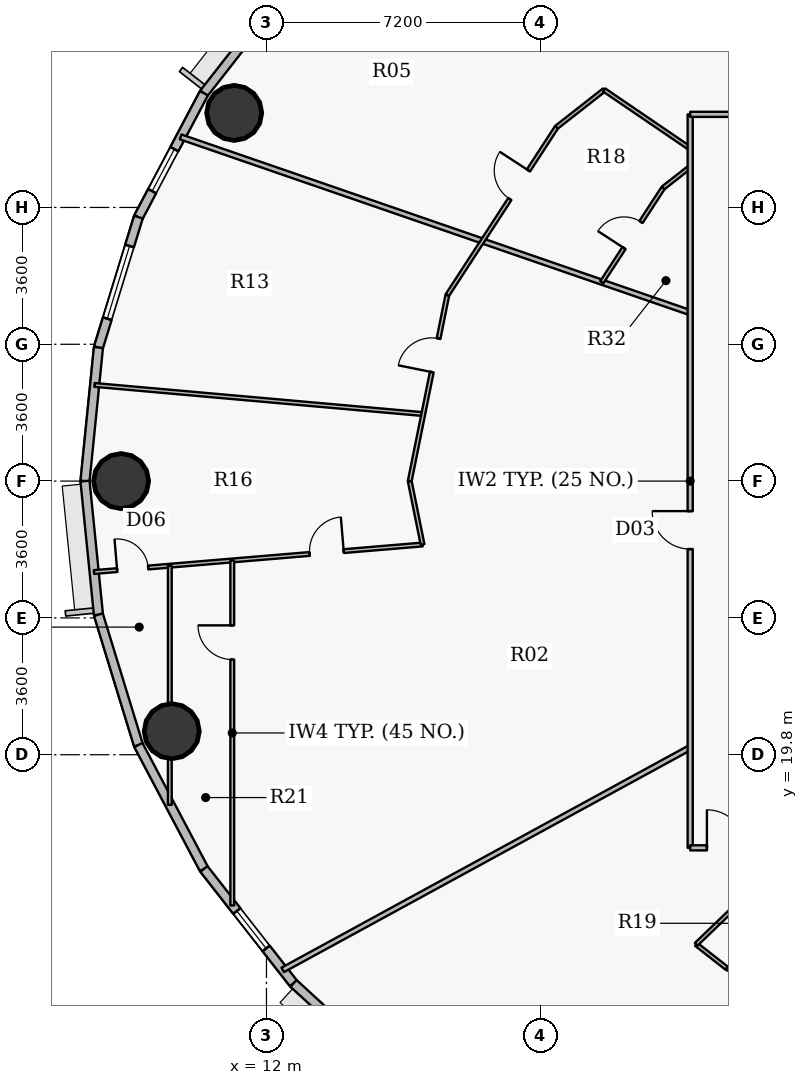
"""IFC4 building model, lengths in metres.
Left out: names, types, materials, properties, quantities, classifications, styles, units other than length and angle.
Written with IfcOpenShell. Run it as: python <this file> out.ifc"""

import sys

from ifc_helpers import new_model, si_unit, direction, frame, frame_2d, origin, origin_2d, place, context, subcontext, project, spatial, rectangle, hollow_circle, extrude, source, transform, mapped, element, fill, save


model = new_model("IFC4")
c1 = context("Model", 3, precision=1e-05, world=origin(), true_north=direction((0.0, 1.0)))
c2 = subcontext(c1, "Body", "Model", "MODEL_VIEW")
j1 = project(units=[si_unit("LENGTHUNIT", "METRE"), si_unit("PLANEANGLEUNIT", "RADIAN")], contexts=[c1])
p1 = place(None, origin())
s1 = spatial("IfcSite", under=j1, at=p1, CompositionType="ELEMENT")
p2 = place(p1, origin())
s2 = spatial("IfcBuilding", under=s1, at=p2, CompositionType="ELEMENT")
p3 = place(p2, frame((0.0, 0.0, 104.7)))
s3 = spatial("IfcBuildingStorey", under=s2, at=p3, CompositionType="ELEMENT", Elevation=104.7)
for number, where, z_axis, x_axis in (
    (1, (11.151, 36.688, 0.0), (0.0, 0.0, 1.0), (1.0, 0.0, 0.0)),
    (2, (8.175, 27.0, 0.0), (0.0, 0.0, 1.0), (1.0, 0.0, 0.0)),
    (3, (9.507, 20.419, 0.0), (0.0, 0.0, 1.0), (1.0, 0.0, 0.0)),
):
    element("IfcColumn", number, at=place(p3, frame(where, z_axis=z_axis, x_axis=x_axis)), inside=s3, PredefinedType="COLUMN", context=c2, shape_type="SweptSolid", body=[
        extrude(hollow_circle(Radius=0.725, WallThickness=0.042, at=origin_2d()), origin(), (0.0, 0.0, 1.0), 3.75),
    ])
p4 = place(p3, frame((10.355, 37.206, 0.0), z_axis=(0.0, 0.0, 1.0), x_axis=(0.616272103517, 0.787533297345, 0.0)))
e4 = element("IfcWall", 4, at=p4, inside=s3, PredefinedType="SOLIDWALL", context=c2, shape_type="SweptSolid", body=[
    extrude(rectangle(XDim=3.823, YDim=0.24, at=frame_2d((1.912, 0.0))), origin(), (0.0, 0.0, 1.0), 3.5),
])
p5 = place(p3, frame((8.63, 33.945, 0.0), z_axis=(0.0, 0.0, 1.0), x_axis=(0.467614004126, 0.883932770716, 0.0)))
e5 = element("IfcWall", 5, at=p5, inside=s3, PredefinedType="SOLIDWALL", context=c2, shape_type="SweptSolid", body=[
    extrude(rectangle(XDim=3.689, YDim=0.24, at=frame_2d((1.844, 0.0))), origin(), (0.0, 0.0, 1.0), 3.5),
])
p6 = place(p5, frame((0.774, 0.0, 0.9)))
e6 = element("IfcOpeningElement", 6, at=p6, cuts=e5, PredefinedType="OPENING", context=c2, shape_type="SweptSolid", body=[
    extrude(rectangle(XDim=1.25, YDim=1.65, at=origin_2d()), frame((0.625, 0.13, 0.825), z_axis=(0.0, -1.0, 0.0), x_axis=(1.0, 0.0, 0.0)), (0.0, 0.0, 1.0), 0.26),
])
p7 = place(p3, frame((7.578, 30.515, 0.0), z_axis=(0.0, 0.0, 1.0), x_axis=(0.293124431344, 0.956074300329, 0.0)))
e7 = element("IfcWall", 7, at=p7, inside=s3, PredefinedType="SOLIDWALL", context=c2, shape_type="SweptSolid", body=[
    extrude(rectangle(XDim=3.587, YDim=0.24, at=frame_2d((1.793, 0.0))), origin(), (0.0, 0.0, 1.0), 3.5),
])
p8 = place(p7, frame((0.794, 0.0, 0.9)))
e8 = element("IfcOpeningElement", 8, at=p8, cuts=e7, PredefinedType="OPENING", context=c2, shape_type="SweptSolid", body=[
    extrude(rectangle(XDim=2.0, YDim=1.75, at=origin_2d()), frame((1.0, 0.13, 0.875), z_axis=(0.0, -1.0, 0.0), x_axis=(1.0, 0.0, 0.0)), (0.0, 0.0, 1.0), 0.26),
])
for number, where, z_axis, x_axis in (
    (9, (7.225, 27.0, 0.0), (0.0, 0.0, 1.0), (0.1, 0.995, 0.0)),
    (10, (7.578, 23.485, 0.0), (0.0, 0.0, 1.0), (-0.1, 0.995, 0.0)),
):
    element("IfcWall", number, at=place(p3, frame(where, z_axis=z_axis, x_axis=x_axis)), inside=s3, PredefinedType="SOLIDWALL", context=c2, shape_type="SweptSolid", body=[
        extrude(rectangle(XDim=3.533, YDim=0.24, at=frame_2d((1.767, 0.0))), origin(), (0.0, 0.0, 1.0), 3.5),
    ])
p9 = place(p3, frame((8.63, 20.055, 0.0), z_axis=(0.0, 0.0, 1.0), x_axis=(-0.293124431344, 0.956074300329, 0.0)))
e11 = element("IfcWall", 11, at=p9, inside=s3, PredefinedType="SOLIDWALL", context=c2, shape_type="SweptSolid", body=[
    extrude(rectangle(XDim=3.587, YDim=0.24, at=frame_2d((1.793, 0.0))), origin(), (0.0, 0.0, 1.0), 3.5),
])
p10 = place(p3, frame((10.355, 16.794, 0.0), z_axis=(0.0, 0.0, 1.0), x_axis=(-0.467614004126, 0.883932770716, 0.0)))
e12 = element("IfcWall", 12, at=p10, inside=s3, PredefinedType="SOLIDWALL", context=c2, shape_type="SweptSolid", body=[
    extrude(rectangle(XDim=3.689, YDim=0.24, at=frame_2d((1.844, 0.0))), origin(), (0.0, 0.0, 1.0), 3.5),
])
p11 = place(p3, frame((12.711, 13.783, 0.0), z_axis=(0.0, 0.0, 1.0), x_axis=(-0.616272103517, 0.787533297345, 0.0)))
e13 = element("IfcWall", 13, at=p11, inside=s3, PredefinedType="SOLIDWALL", context=c2, shape_type="SweptSolid", body=[
    extrude(rectangle(XDim=3.823, YDim=0.24, at=frame_2d((1.912, 0.0))), origin(), (0.0, 0.0, 1.0), 3.5),
])
p12 = place(p11, frame((1.168, 0.0, 0.9)))
e14 = element("IfcOpeningElement", 14, at=p12, cuts=e13, PredefinedType="OPENING", context=c2, shape_type="SweptSolid", body=[
    extrude(rectangle(XDim=1.25, YDim=1.65, at=origin_2d()), frame((0.625, 0.13, 0.825), z_axis=(0.0, -1.0, 0.0), x_axis=(1.0, 0.0, 0.0)), (0.0, 0.0, 1.0), 0.26),
])
p13 = place(p3, frame((15.642, 11.097, 0.0), z_axis=(0.0, 0.0, 1.0), x_axis=(-0.737113356241, 0.675769117414, 0.0)))
e15 = element("IfcWall", 15, at=p13, inside=s3, PredefinedType="SOLIDWALL", context=c2, shape_type="SweptSolid", body=[
    extrude(rectangle(XDim=3.976, YDim=0.24, at=frame_2d((1.988, 0.0))), origin(), (0.0, 0.0, 1.0), 3.5),
])
p14 = place(p3, frame((7.461, 24.606, 0.0), z_axis=(0.0, 0.0, 1.0), x_axis=(0.996502351316, 0.083564728334, 0.0)))
e16 = element("IfcWall", 16, at=p14, inside=s3, PredefinedType="PARTITIONING", context=c2, shape_type="SweptSolid", body=[
    extrude(rectangle(XDim=8.677, YDim=0.1, at=frame_2d((4.338, 0.0))), origin(), (0.0, 0.0, 1.0), 2.935),
])
p15 = place(p14, frame((5.695, 0.0, 0.0)))
e17 = element("IfcOpeningElement", 17, at=p15, cuts=e16, PredefinedType="OPENING", context=c2, shape_type="SweptSolid", body=[
    extrude(rectangle(XDim=0.9, YDim=2.1, at=origin_2d()), frame((0.45, 0.06, 1.05), z_axis=(0.0, -1.0, 0.0), x_axis=(1.0, 0.0, 0.0)), (0.0, 0.0, 1.0), 0.12),
])
p16 = place(p14, frame((0.612, 0.0, 0.0)))
e18 = element("IfcOpeningElement", 18, at=p16, cuts=e16, PredefinedType="OPENING", context=c2, shape_type="SweptSolid", body=[
    extrude(rectangle(XDim=0.82, YDim=2.1, at=origin_2d()), frame((0.41, 0.06, 1.05), z_axis=(0.0, -1.0, 0.0), x_axis=(1.0, 0.0, 0.0)), (0.0, 0.0, 1.0), 0.12),
])
p17 = place(p3, frame((7.474, 29.53, 0.0), z_axis=(0.0, 0.0, 1.0), x_axis=(0.99609030315, -0.088340862406, 0.0)))
e19 = element("IfcWall", 19, at=p17, inside=s3, PredefinedType="PARTITIONING", context=c2, shape_type="SweptSolid", body=[
    extrude(rectangle(XDim=8.686, YDim=0.1, at=frame_2d((4.343, 0.0))), origin(), (0.0, 0.0, 1.0), 2.935),
])
p18 = place(p3, frame((9.457, 18.481, 0.0), z_axis=(0.0, 0.0, 1.0), x_axis=(0.0, 1.0, 0.0)))
e20 = element("IfcWall", 20, at=p18, inside=s3, PredefinedType="PARTITIONING", context=c2, shape_type="SweptSolid", body=[
    extrude(rectangle(XDim=6.293, YDim=0.1, at=frame_2d((3.146, 0.0))), origin(), (0.0, 0.0, 1.0), 2.935),
])
p19 = place(p3, frame((9.741, 36.057, 0.0), z_axis=(0.0, 0.0, 1.0), x_axis=(0.945349748634, -0.326058051207, 0.0)))
e21 = element("IfcWall", 21, at=p19, inside=s3, PredefinedType="PARTITIONING", context=c2, shape_type="SweptSolid", body=[
    extrude(rectangle(XDim=14.184, YDim=0.135, at=frame_2d((7.092, 0.0))), origin(), (0.0, 0.0, 1.0), 2.935),
])
p20 = place(p3, frame((11.1, 15.834, 0.0), z_axis=(0.0, 0.0, 1.0), x_axis=(0.0, 1.0, 0.0)))
e22 = element("IfcWall", 22, at=p20, inside=s3, PredefinedType="PARTITIONING", context=c2, shape_type="SweptSolid", body=[
    extrude(rectangle(XDim=9.078, YDim=0.1, at=frame_2d((4.539, 0.0))), origin(), (0.0, 0.0, 1.0), 2.935),
])
p21 = place(p20, frame((6.47, 0.0, 0.0)))
e23 = element("IfcOpeningElement", 23, at=p21, cuts=e22, PredefinedType="OPENING", context=c2, shape_type="SweptSolid", body=[
    extrude(rectangle(XDim=0.9, YDim=2.1, at=origin_2d()), frame((0.45, 0.06, 1.05), z_axis=(0.0, -1.0, 0.0), x_axis=(1.0, 0.0, 0.0)), (0.0, 0.0, 1.0), 0.12),
])
p22 = place(p3, frame((12.427, 14.138, 0.0), z_axis=(0.0, 0.0, 1.0), x_axis=(0.877835987922, 0.47896135367, 0.0)))
e24 = element("IfcWall", 24, at=p22, inside=s3, PredefinedType="PARTITIONING", context=c2, shape_type="SweptSolid", body=[
    extrude(rectangle(XDim=12.215, YDim=0.135, at=frame_2d((6.107, 0.0))), origin(), (0.0, 0.0, 1.0), 2.935),
])
p23 = place(p3, frame((15.77, 27.0, 0.0), z_axis=(0.0, 0.0, 1.0), x_axis=(0.198211883057, -0.980159195955, 0.0)))
e25 = element("IfcWall", 25, at=p23, inside=s3, PredefinedType="PARTITIONING", context=c2, shape_type="SweptSolid", body=[
    extrude(rectangle(XDim=1.702, YDim=0.1, at=frame_2d((0.851, 0.0))), origin(), (0.0, 0.0, 1.0), 2.935),
])
p24 = place(p3, frame((15.77, 27.0, 0.0), z_axis=(0.0, 0.0, 1.0), x_axis=(0.198230919145, 0.980155346205, 0.0)))
e26 = element("IfcWall", 26, at=p24, inside=s3, PredefinedType="PARTITIONING", context=c2, shape_type="SweptSolid", body=[
    extrude(rectangle(XDim=4.994, YDim=0.1, at=frame_2d((2.497, 0.0))), origin(), (0.0, 0.0, 1.0), 2.935),
])
p25 = place(p24, frame((2.926, 0.0, 0.0)))
e27 = element("IfcOpeningElement", 27, at=p25, cuts=e26, PredefinedType="OPENING", context=c2, shape_type="SweptSolid", body=[
    extrude(rectangle(XDim=0.9, YDim=2.1, at=origin_2d()), frame((0.45, 0.06, 1.05), z_axis=(0.0, -1.0, 0.0), x_axis=(1.0, 0.0, 0.0)), (0.0, 0.0, 1.0), 0.12),
])
p26 = place(p3, frame((16.76, 31.895, 0.0), z_axis=(0.0, 0.0, 1.0), x_axis=(0.545405249109, 0.838172484781, 0.0)))
e28 = element("IfcWall", 28, at=p26, inside=s3, PredefinedType="PARTITIONING", context=c2, shape_type="SweptSolid", body=[
    extrude(rectangle(XDim=5.269, YDim=0.1, at=frame_2d((2.634, 0.0))), origin(), (0.0, 0.0, 1.0), 2.935),
])
p27 = place(p26, frame((3.012, 0.0, 0.0)))
e29 = element("IfcOpeningElement", 29, at=p27, cuts=e28, PredefinedType="OPENING", context=c2, shape_type="SweptSolid", body=[
    extrude(rectangle(XDim=0.9, YDim=2.1, at=origin_2d()), frame((0.45, 0.06, 1.05), z_axis=(0.0, -1.0, 0.0), x_axis=(1.0, 0.0, 0.0)), (0.0, 0.0, 1.0), 0.12),
])
p28 = place(p3, frame((19.634, 36.311, 0.0), z_axis=(0.0, 0.0, 1.0), x_axis=(0.787313775385, 0.616552527437, 0.0)))
e30 = element("IfcWall", 30, at=p28, inside=s3, PredefinedType="PARTITIONING", context=c2, shape_type="SweptSolid", body=[
    extrude(rectangle(XDim=1.59, YDim=0.1, at=frame_2d((0.795, 0.0))), origin(), (0.0, 0.0, 1.0), 3.5),
])
p29 = place(p3, frame((20.04, 45.668, 0.0), z_axis=(0.0, 0.0, 1.0), x_axis=(0.649828321201, -0.760081017369, 0.0)))
e31 = element("IfcWall", 31, at=p29, inside=s3, PredefinedType="PARTITIONING", context=c2, shape_type="SweptSolid", body=[
    extrude(rectangle(XDim=11.865, YDim=0.135, at=frame_2d((5.932, 0.0))), origin(), (0.0, 0.0, 1.0), 2.935),
])
p30 = place(p3, frame((20.825, 32.234, 0.0), z_axis=(0.0, 0.0, 1.0), x_axis=(0.545376787896, 0.838191004023, 0.0)))
e32 = element("IfcWall", 32, at=p30, inside=s3, PredefinedType="PARTITIONING", context=c2, shape_type="SweptSolid", body=[
    extrude(rectangle(XDim=2.96, YDim=0.1, at=frame_2d((1.48, 0.0))), origin(), (0.0, 0.0, 1.0), 2.935),
])
p31 = place(p30, frame((1.07, 0.0, 0.0)))
e33 = element("IfcOpeningElement", 33, at=p31, cuts=e32, PredefinedType="OPENING", context=c2, shape_type="SweptSolid", body=[
    extrude(rectangle(XDim=0.82, YDim=2.1, at=origin_2d()), frame((0.41, 0.06, 1.05), z_axis=(0.0, -1.0, 0.0), x_axis=(1.0, 0.0, 0.0)), (0.0, 0.0, 1.0), 0.12),
])
p32 = place(p3, frame((20.885, 37.291, 0.0), z_axis=(0.0, 0.0, 1.0), x_axis=(0.826581607155, -0.562816885596, 0.0)))
e34 = element("IfcWall", 34, at=p32, inside=s3, PredefinedType="PARTITIONING", context=c2, shape_type="SweptSolid", body=[
    extrude(rectangle(XDim=2.74, YDim=0.1, at=frame_2d((1.37, 0.0))), origin(), (0.0, 0.0, 1.0), 3.5),
])
p33 = place(p3, frame((22.439, 34.715, 0.0), z_axis=(0.0, 0.0, 1.0), x_axis=(0.787265250498, 0.616614486821, 0.0)))
e35 = element("IfcWall", 35, at=p33, inside=s3, PredefinedType="PARTITIONING", context=c2, shape_type="SweptSolid", body=[
    extrude(rectangle(XDim=0.903, YDim=0.1, at=frame_2d((0.451, 0.0))), origin(), (0.0, 0.0, 1.0), 3.5),
])
p34 = place(p3, frame((23.15, 17.35, 0.0), z_axis=(0.0, 0.0, 1.0), x_axis=(0.0, 1.0, 0.0)))
e36 = element("IfcWall", 36, at=p34, inside=s3, PredefinedType="PARTITIONING", context=c2, shape_type="SweptSolid", body=[
    extrude(rectangle(XDim=19.3, YDim=0.135, at=frame_2d((9.65, 0.0))), origin(), (0.0, 0.0, 1.0), 2.935),
])
p35 = place(p34, frame((7.86, 0.0, 0.0)))
e37 = element("IfcOpeningElement", 37, at=p35, cuts=e36, PredefinedType="OPENING", context=c2, shape_type="SweptSolid", body=[
    extrude(rectangle(XDim=1.0, YDim=2.15, at=origin_2d()), frame((0.5, 0.078, 1.075), z_axis=(0.0, -1.0, 0.0), x_axis=(1.0, 0.0, 0.0)), (0.0, 0.0, 1.0), 0.155),
])
p36 = place(p3, frame((23.15, 17.35, 0.0), z_axis=(0.0, 0.0, 1.0), x_axis=(1.0, 0.0, 0.0)))
e38 = element("IfcWall", 38, at=p36, inside=s3, PredefinedType="PARTITIONING", context=c2, shape_type="SweptSolid", body=[
    extrude(rectangle(XDim=10.373, YDim=0.135, at=frame_2d((5.187, 0.0))), origin(), (0.0, 0.0, 1.0), 2.935),
])
p37 = place(p36, frame((0.44, 0.0, 0.0)))
e39 = element("IfcOpeningElement", 39, at=p37, cuts=e38, PredefinedType="OPENING", context=c2, shape_type="SweptSolid", body=[
    extrude(rectangle(XDim=1.0, YDim=2.15, at=origin_2d()), frame((0.5, 0.078, 1.075), z_axis=(0.0, -1.0, 0.0), x_axis=(1.0, 0.0, 0.0)), (0.0, 0.0, 1.0), 0.155),
])
p38 = place(p3, frame((23.15, 36.65, 0.0), z_axis=(0.0, 0.0, 1.0), x_axis=(1.0, 0.0, 0.0)))
e40 = element("IfcWall", 40, at=p38, inside=s3, PredefinedType="PARTITIONING", context=c2, shape_type="SweptSolid", body=[
    extrude(rectangle(XDim=10.373, YDim=0.135, at=frame_2d((5.187, 0.0))), origin(), (0.0, 0.0, 1.0), 2.935),
])
p39 = place(p38, frame((6.966, 0.0, 0.0)))
e41 = element("IfcOpeningElement", 41, at=p39, cuts=e40, PredefinedType="OPENING", context=c2, shape_type="SweptSolid", body=[
    extrude(rectangle(XDim=1.0, YDim=2.15, at=origin_2d()), frame((0.5, 0.078, 1.075), z_axis=(0.0, -1.0, 0.0), x_axis=(1.0, 0.0, 0.0)), (0.0, 0.0, 1.0), 0.155),
])
p40 = place(p38, frame((1.82, 0.0, 0.0)))
e42 = element("IfcOpeningElement", 42, at=p40, cuts=e40, PredefinedType="OPENING", context=c2, shape_type="SweptSolid", body=[
    extrude(rectangle(XDim=1.0, YDim=2.15, at=origin_2d()), frame((0.5, 0.078, 1.075), z_axis=(0.0, -1.0, 0.0), x_axis=(1.0, 0.0, 0.0)), (0.0, 0.0, 1.0), 0.155),
])
p41 = place(p3, frame((23.307, 14.812, 0.0), z_axis=(0.0, 0.0, 1.0), x_axis=(0.787398737985, -0.616444018075, 0.0)))
e43 = element("IfcWall", 43, at=p41, inside=s3, PredefinedType="PARTITIONING", context=c2, shape_type="SweptSolid", body=[
    extrude(rectangle(XDim=1.018, YDim=0.1, at=frame_2d((0.509, 0.0))), origin(), (0.0, 0.0, 1.0), 3.085),
])
p42 = place(p3, frame((23.307, 14.812, 0.0), z_axis=(0.0, 0.0, 1.0), x_axis=(0.721286127108, 0.692637223113, 0.0)))
e44 = element("IfcWall", 44, at=p42, inside=s3, PredefinedType="PARTITIONING", context=c2, shape_type="SweptSolid", body=[
    extrude(rectangle(XDim=3.664, YDim=0.1, at=frame_2d((1.832, 0.0))), origin(), (0.0, 0.0, 1.0), 3.5),
])
p43 = place(p3, frame((23.808, 6.661, 0.0), z_axis=(0.0, 0.0, 1.0), x_axis=(0.51416439954, 0.857691652195, 0.0)))
e45 = element("IfcWall", 45, at=p43, inside=s3, PredefinedType="PARTITIONING", context=c2, shape_type="SweptSolid", body=[
    extrude(rectangle(XDim=12.462, YDim=0.135, at=frame_2d((6.231, 0.0))), origin(), (0.0, 0.0, 1.0), 2.935),
])
p44 = place(p3, frame((24.109, 14.184, 0.0), z_axis=(0.0, 0.0, 1.0), x_axis=(0.9288090756, -0.370558633798, 0.0)))
e46 = element("IfcWall", 46, at=p44, inside=s3, PredefinedType="PARTITIONING", context=c2, shape_type="SweptSolid", body=[
    extrude(rectangle(XDim=6.072, YDim=0.1, at=frame_2d((3.036, 0.0))), origin(), (0.0, 0.0, 1.0), 2.935),
])
p45 = place(p44, frame((1.398, 0.0, 0.0)))
e47 = element("IfcOpeningElement", 47, at=p45, cuts=e46, PredefinedType="OPENING", context=c2, shape_type="SweptSolid", body=[
    extrude(rectangle(XDim=0.9, YDim=2.1, at=origin_2d()), frame((0.45, 0.06, 1.05), z_axis=(0.0, -1.0, 0.0), x_axis=(1.0, 0.0, 0.0)), (0.0, 0.0, 1.0), 0.12),
])
m1 = source(origin(), c2, "Body", "SweptSolid", [
    extrude(rectangle(XDim=1.25, YDim=1.65, at=origin_2d()), frame((0.625, 0.03, 0.825), z_axis=(0.0, -1.0, 0.0), x_axis=(1.0, 0.0, 0.0)), (0.0, 0.0, 1.0), 0.06),
])
p46 = place(p6, origin())
e48 = element("IfcWindow", 48, at=p46, inside=s3, PartitioningType="SINGLE_PANEL", PredefinedType="WINDOW", context=c2, shape_type="MappedRepresentation", body=[
    mapped(m1, transform((0.0, 0.0, 0.0), x_axis=(1.0, 0.0, 0.0), y_axis=(0.0, 1.0, 0.0), z_axis=(0.0, 0.0, 1.0), scale=1.0)),
])
fill(e6, e48)
m2 = source(origin(), c2, "Body", "SweptSolid", [
    extrude(rectangle(XDim=2.0, YDim=1.75, at=origin_2d()), frame((1.0, 0.03, 0.875), z_axis=(0.0, -1.0, 0.0), x_axis=(1.0, 0.0, 0.0)), (0.0, 0.0, 1.0), 0.06),
])
p47 = place(p8, origin())
e49 = element("IfcWindow", 49, at=p47, inside=s3, PartitioningType="DOUBLE_PANEL_VERTICAL", PredefinedType="WINDOW", context=c2, shape_type="MappedRepresentation", body=[
    mapped(m2, transform((0.0, 0.0, 0.0), x_axis=(1.0, 0.0, 0.0), y_axis=(0.0, 1.0, 0.0), z_axis=(0.0, 0.0, 1.0), scale=1.0)),
])
fill(e8, e49)
p48 = place(p12, origin())
e50 = element("IfcWindow", 50, at=p48, inside=s3, PartitioningType="SINGLE_PANEL", PredefinedType="WINDOW", context=c2, shape_type="MappedRepresentation", body=[
    mapped(m1, transform((0.0, 0.0, 0.0), x_axis=(1.0, 0.0, 0.0), y_axis=(0.0, 1.0, 0.0), z_axis=(0.0, 0.0, 1.0), scale=1.0)),
])
fill(e14, e50)
m3 = source(origin(), c2, "Body", "SweptSolid", [
    extrude(rectangle(XDim=0.9, YDim=2.1, at=origin_2d()), frame((0.45, 0.025, 1.05), z_axis=(0.0, -1.0, 0.0), x_axis=(1.0, 0.0, 0.0)), (0.0, 0.0, 1.0), 0.05),
])
p49 = place(p27, origin())
e51 = element("IfcDoor", 51, at=p49, inside=s3, OperationType="SINGLE_SWING_RIGHT", PredefinedType="DOOR", context=c2, shape_type="MappedRepresentation", body=[
    mapped(m3, transform((0.0, 0.0, 0.0), x_axis=(1.0, 0.0, 0.0), y_axis=(0.0, 1.0, 0.0), z_axis=(0.0, 0.0, 1.0), scale=1.0)),
])
fill(e29, e51)
m4 = source(origin(), c2, "Body", "SweptSolid", [
    extrude(rectangle(XDim=0.82, YDim=2.1, at=origin_2d()), frame((0.41, 0.025, 1.05), z_axis=(0.0, -1.0, 0.0), x_axis=(1.0, 0.0, 0.0)), (0.0, 0.0, 1.0), 0.05),
])
p50 = place(p31, origin())
e52 = element("IfcDoor", 52, at=p50, inside=s3, OperationType="SINGLE_SWING_LEFT", PredefinedType="DOOR", context=c2, shape_type="MappedRepresentation", body=[
    mapped(m4, transform((0.0, 0.0, 0.0), x_axis=(1.0, 0.0, 0.0), y_axis=(0.0, 1.0, 0.0), z_axis=(0.0, 0.0, 1.0), scale=1.0)),
])
fill(e33, e52)
m5 = source(origin(), c2, "Body", "SweptSolid", [
    extrude(rectangle(XDim=1.0, YDim=2.15, at=origin_2d()), frame((0.5, 0.025, 1.075), z_axis=(0.0, -1.0, 0.0), x_axis=(1.0, 0.0, 0.0)), (0.0, 0.0, 1.0), 0.05),
])
p51 = place(p35, origin())
e53 = element("IfcDoor", 53, at=p51, inside=s3, OperationType="SINGLE_SWING_RIGHT", PredefinedType="DOOR", context=c2, shape_type="MappedRepresentation", body=[
    mapped(m5, transform((0.0, 0.0, 0.0), x_axis=(1.0, 0.0, 0.0), y_axis=(0.0, 1.0, 0.0), z_axis=(0.0, 0.0, 1.0), scale=1.0)),
])
fill(e37, e53)
p52 = place(p25, origin())
e54 = element("IfcDoor", 54, at=p52, inside=s3, OperationType="SINGLE_SWING_LEFT", PredefinedType="DOOR", context=c2, shape_type="MappedRepresentation", body=[
    mapped(m3, transform((0.0, 0.0, 0.0), x_axis=(1.0, 0.0, 0.0), y_axis=(0.0, 1.0, 0.0), z_axis=(0.0, 0.0, 1.0), scale=1.0)),
])
fill(e27, e54)
p53 = place(p15, origin())
e55 = element("IfcDoor", 55, at=p53, inside=s3, OperationType="SINGLE_SWING_RIGHT", PredefinedType="DOOR", context=c2, shape_type="MappedRepresentation", body=[
    mapped(m3, transform((0.0, 0.0, 0.0), x_axis=(1.0, 0.0, 0.0), y_axis=(0.0, 1.0, 0.0), z_axis=(0.0, 0.0, 1.0), scale=1.0)),
])
fill(e17, e55)
p54 = place(p16, origin())
e56 = element("IfcDoor", 56, at=p54, inside=s3, OperationType="SINGLE_SWING_LEFT", PredefinedType="DOOR", context=c2, shape_type="MappedRepresentation", body=[
    mapped(m4, transform((0.0, 0.0, 0.0), x_axis=(1.0, 0.0, 0.0), y_axis=(0.0, 1.0, 0.0), z_axis=(0.0, 0.0, 1.0), scale=1.0)),
])
fill(e18, e56)
p55 = place(p21, origin())
e57 = element("IfcDoor", 57, at=p55, inside=s3, OperationType="SINGLE_SWING_RIGHT", PredefinedType="DOOR", context=c2, shape_type="MappedRepresentation", body=[
    mapped(m3, transform((0.0, 0.0, 0.0), x_axis=(1.0, 0.0, 0.0), y_axis=(0.0, 1.0, 0.0), z_axis=(0.0, 0.0, 1.0), scale=1.0)),
])
fill(e23, e57)
p56 = place(p37, origin())
e58 = element("IfcDoor", 58, at=p56, inside=s3, OperationType="SINGLE_SWING_LEFT", PredefinedType="DOOR", context=c2, shape_type="MappedRepresentation", body=[
    mapped(m5, transform((0.0, 0.0, 0.0), x_axis=(1.0, 0.0, 0.0), y_axis=(0.0, 1.0, 0.0), z_axis=(0.0, 0.0, 1.0), scale=1.0)),
])
fill(e39, e58)
save(model, sys.argv[1])
